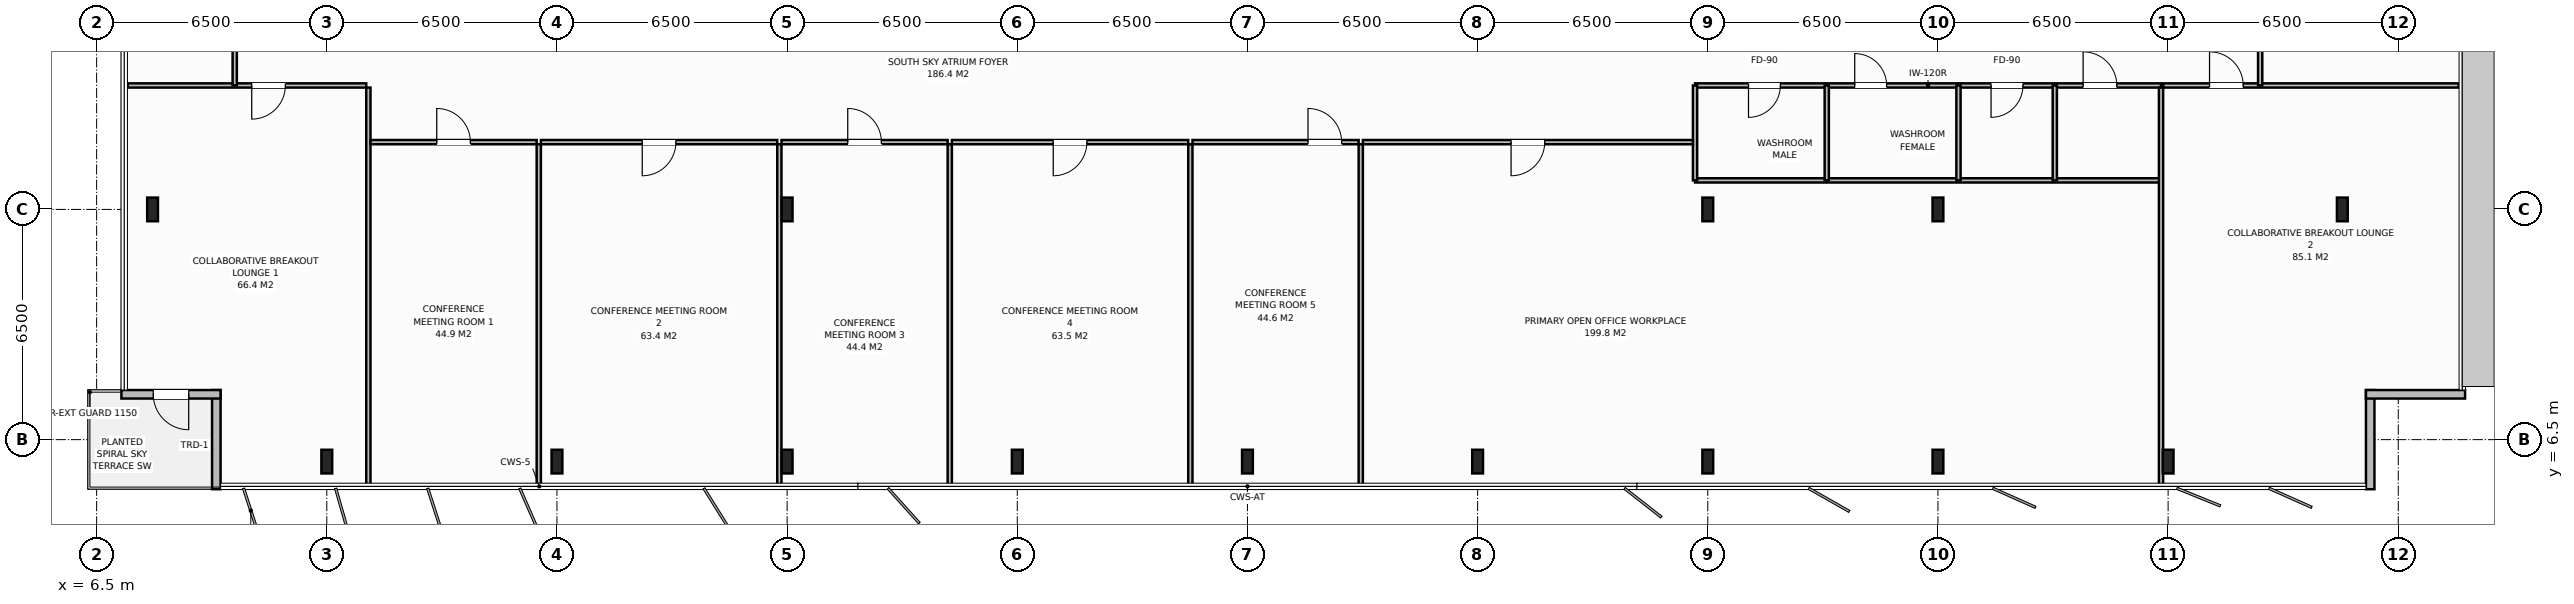
"""IFC4 building model, lengths in metres.
Left out: names, types, materials, properties, quantities, classifications, styles, units other than length and angle.
Written with IfcOpenShell. Run it as: python <this file> out.ifc"""

import sys

from ifc_helpers import new_model, si_unit, direction, frame, frame_2d, origin, origin_2d, place, context, subcontext, project, spatial, rectangle, i_section, extrude, element, fill, save


model = new_model("IFC4")
c1 = context("Model", 3, precision=1e-05, world=origin(), true_north=direction((0.0, 1.0)))
c2 = subcontext(c1, "Body", "Model", "MODEL_VIEW")
j1 = project(units=[si_unit("LENGTHUNIT", "METRE"), si_unit("PLANEANGLEUNIT", "RADIAN")], contexts=[c1])
p1 = place(None, origin())
s1 = spatial("IfcSite", under=j1, at=p1, CompositionType="ELEMENT")
p2 = place(p1, origin())
s2 = spatial("IfcBuilding", under=s1, at=p2, CompositionType="ELEMENT")
p3 = place(p2, frame((0.0, 0.0, 290.4)))
s3 = spatial("IfcBuildingStorey", under=s2, at=p3, CompositionType="ELEMENT", Elevation=290.4)
for number, where, z_axis, x_axis in (
    (1, (58.5, 13.0, 0.0), (0.0, 0.0, 1.0), (1.0, 0.0, 0.0)),
    (2, (26.0, 13.0, 0.0), (0.0, 0.0, 1.0), (1.0, 0.0, 0.0)),
    (3, (52.0, 13.0, 0.0), (0.0, 0.0, 1.0), (1.0, 0.0, 0.0)),
    (4, (13.0, 5.88, 0.0), (0.0, 0.0, 1.0), (1.0, 0.0, 0.0)),
    (5, (19.5, 5.88, 0.0), (0.0, 0.0, 1.0), (1.0, 0.0, 0.0)),
    (6, (26.0, 5.88, 0.0), (0.0, 0.0, 1.0), (1.0, 0.0, 0.0)),
    (7, (32.5, 5.88, 0.0), (0.0, 0.0, 1.0), (1.0, 0.0, 0.0)),
    (8, (39.0, 5.88, 0.0), (0.0, 0.0, 1.0), (1.0, 0.0, 0.0)),
    (9, (45.5, 5.88, 0.0), (0.0, 0.0, 1.0), (1.0, 0.0, 0.0)),
    (10, (52.0, 5.88, 0.0), (0.0, 0.0, 1.0), (1.0, 0.0, 0.0)),
    (11, (58.5, 5.88, 0.0), (0.0, 0.0, 1.0), (1.0, 0.0, 0.0)),
    (12, (65.0, 5.88, 0.0), (0.0, 0.0, 1.0), (1.0, 0.0, 0.0)),
    (13, (8.08, 13.0, 0.0), (0.0, 0.0, 1.0), (1.0, 0.0, 0.0)),
    (14, (69.92, 13.0, 0.0), (0.0, 0.0, 1.0), (1.0, 0.0, 0.0)),
):
    element("IfcColumn", number, at=place(p3, frame(where, z_axis=z_axis, x_axis=x_axis)), inside=s3, PredefinedType="COLUMN", context=c2, shape_type="SweptSolid", body=[
        extrude(i_section(OverallWidth=0.305, OverallDepth=0.668, WebThickness=0.021, FlangeThickness=0.04, at=origin_2d()), origin(), (0.0, 0.0, 1.0), 4.0),
    ])
p4 = place(p3, frame((9.88, 5.1, 0.0), z_axis=(0.0, 0.0, 1.0), x_axis=(0.0, 1.0, 0.0)))
e15 = element("IfcWall", 15, at=p4, inside=s3, PredefinedType="STANDARD", context=c2, shape_type="SweptSolid", body=[
    extrude(rectangle(XDim=2.8, YDim=0.24, at=frame_2d((1.4, 0.0))), origin(), (0.0, 0.0, 1.0), 3.788),
])
p5 = place(p3, frame((10.0, 7.78, 0.0), z_axis=(0.0, 0.0, 1.0), x_axis=(-1.0, 0.0, 0.0)))
e16 = element("IfcWall", 16, at=p5, inside=s3, PredefinedType="STANDARD", context=c2, shape_type="SweptSolid", body=[
    extrude(rectangle(XDim=2.8, YDim=0.24, at=frame_2d((1.4, 0.0))), origin(), (0.0, 0.0, 1.0), 3.788),
])
p6 = place(p5, frame((0.9, 0.0, 0.0)))
e17 = element("IfcOpeningElement", 17, at=p6, cuts=e16, PredefinedType="OPENING", context=c2, shape_type="SweptSolid", body=[
    extrude(rectangle(XDim=1.0, YDim=2.2, at=frame_2d((0.5, 1.1))), frame((0.0, 0.13, 0.0), z_axis=(0.0, -1.0, 0.0), x_axis=(1.0, 0.0, 0.0)), (0.0, 0.0, 1.0), 0.26),
])
for number, where, z_axis, x_axis in (
    (18, (70.707, 7.9, 0.0), (0.0, 0.0, 1.0), (0.0, -1.0, 0.0)),
    (19, (73.387, 7.78, 0.0), (0.0, 0.0, 1.0), (-1.0, 0.0, 0.0)),
):
    element("IfcWall", number, at=place(p3, frame(where, z_axis=z_axis, x_axis=x_axis)), inside=s3, PredefinedType="STANDARD", context=c2, shape_type="SweptSolid", body=[
        extrude(rectangle(XDim=2.8, YDim=0.24, at=frame_2d((1.4, 0.0))), origin(), (0.0, 0.0, 1.0), 3.788),
    ])
p7 = place(p3, frame((51.64, 16.5, 0.0), z_axis=(0.0, 0.0, 1.0), x_axis=(1.0, 0.0, 0.0)))
e20 = element("IfcWall", 20, at=p7, inside=s3, PredefinedType="PARTITIONING", context=c2, shape_type="SweptSolid", body=[
    extrude(rectangle(XDim=13.16, YDim=0.12, at=frame_2d((6.58, 0.0))), origin(), (0.0, 0.0, 1.0), 3.788),
])
p8 = place(p7, frame((1.51, 0.0, 0.0)))
e21 = element("IfcOpeningElement", 21, at=p8, cuts=e20, PredefinedType="OPENING", context=c2, shape_type="SweptSolid", body=[
    extrude(rectangle(XDim=0.9, YDim=2.15, at=frame_2d((0.45, 1.075))), frame((0.0, 0.07, 0.0), z_axis=(0.0, -1.0, 0.0), x_axis=(1.0, 0.0, 0.0)), (0.0, 0.0, 1.0), 0.14),
])
p9 = place(p7, frame((4.51, 0.0, 0.0)))
e22 = element("IfcOpeningElement", 22, at=p9, cuts=e20, PredefinedType="OPENING", context=c2, shape_type="SweptSolid", body=[
    extrude(rectangle(XDim=0.9, YDim=2.15, at=frame_2d((0.45, 1.075))), frame((0.0, 0.07, 0.0), z_axis=(0.0, -1.0, 0.0), x_axis=(1.0, 0.0, 0.0)), (0.0, 0.0, 1.0), 0.14),
])
p10 = place(p7, frame((8.36, 0.0, 0.0)))
e23 = element("IfcOpeningElement", 23, at=p10, cuts=e20, PredefinedType="OPENING", context=c2, shape_type="SweptSolid", body=[
    extrude(rectangle(XDim=0.9, YDim=2.15, at=frame_2d((0.45, 1.075))), frame((0.0, 0.07, 0.0), z_axis=(0.0, -1.0, 0.0), x_axis=(1.0, 0.0, 0.0)), (0.0, 0.0, 1.0), 0.14),
])
p11 = place(p7, frame((10.96, 0.0, 0.0)))
e24 = element("IfcOpeningElement", 24, at=p11, cuts=e20, PredefinedType="OPENING", context=c2, shape_type="SweptSolid", body=[
    extrude(rectangle(XDim=0.95, YDim=2.15, at=frame_2d((0.475, 1.075))), frame((0.0, 0.07, 0.0), z_axis=(0.0, -1.0, 0.0), x_axis=(1.0, 0.0, 0.0)), (0.0, 0.0, 1.0), 0.14),
])
p12 = place(p3, frame((51.64, 13.82, 0.0), z_axis=(0.0, 0.0, 1.0), x_axis=(1.0, 0.0, 0.0)))
e25 = element("IfcWall", 25, at=p12, inside=s3, PredefinedType="PARTITIONING", context=c2, shape_type="SweptSolid", body=[
    extrude(rectangle(XDim=13.16, YDim=0.12, at=frame_2d((6.58, 0.0))), origin(), (0.0, 0.0, 1.0), 3.788),
])
for number, where, z_axis, x_axis in (
    (26, (51.64, 13.82, 0.0), (0.0, 0.0, 1.0), (0.0, 1.0, 0.0)),
    (27, (55.36, 13.82, 0.0), (0.0, 0.0, 1.0), (0.0, 1.0, 0.0)),
    (28, (59.08, 13.82, 0.0), (0.0, 0.0, 1.0), (0.0, 1.0, 0.0)),
    (29, (61.8, 13.82, 0.0), (0.0, 0.0, 1.0), (0.0, 1.0, 0.0)),
):
    element("IfcWall", number, at=place(p3, frame(where, z_axis=z_axis, x_axis=x_axis)), inside=s3, PredefinedType="PARTITIONING", context=c2, shape_type="SweptSolid", body=[
        extrude(rectangle(XDim=2.68, YDim=0.12, at=frame_2d((1.34, 0.0))), origin(), (0.0, 0.0, 1.0), 3.788),
    ])
p13 = place(p3, frame((14.174, 5.12, 0.0), z_axis=(0.0, 0.0, 1.0), x_axis=(0.0, 1.0, 0.0)))
e30 = element("IfcWall", 30, at=p13, inside=s3, PredefinedType="PARTITIONING", context=c2, shape_type="SweptSolid", body=[
    extrude(rectangle(XDim=11.32, YDim=0.12, at=frame_2d((5.66, 0.0))), origin(), (0.0, 0.0, 1.0), 3.788),
])
p14 = place(p3, frame((7.38, 16.5, 0.0), z_axis=(0.0, 0.0, 1.0), x_axis=(1.0, 0.0, 0.0)))
e31 = element("IfcWall", 31, at=p14, inside=s3, PredefinedType="PARTITIONING", context=c2, shape_type="SweptSolid", body=[
    extrude(rectangle(XDim=6.734, YDim=0.12, at=frame_2d((3.367, 0.0))), origin(), (0.0, 0.0, 1.0), 3.788),
])
p15 = place(p14, frame((3.5, 0.0, 0.0)))
e32 = element("IfcOpeningElement", 32, at=p15, cuts=e31, PredefinedType="OPENING", context=c2, shape_type="SweptSolid", body=[
    extrude(rectangle(XDim=0.95, YDim=2.15, at=frame_2d((0.475, 1.075))), frame((0.0, 0.07, 0.0), z_axis=(0.0, -1.0, 0.0), x_axis=(1.0, 0.0, 0.0)), (0.0, 0.0, 1.0), 0.14),
])
p16 = place(p3, frame((18.987, 5.12, 0.0), z_axis=(0.0, 0.0, 1.0), x_axis=(0.0, 1.0, 0.0)))
e33 = element("IfcWall", 33, at=p16, inside=s3, PredefinedType="PARTITIONING", context=c2, shape_type="SweptSolid", body=[
    extrude(rectangle(XDim=9.72, YDim=0.12, at=frame_2d((4.86, 0.0))), origin(), (0.0, 0.0, 1.0), 3.788),
])
p17 = place(p3, frame((14.234, 14.9, 0.0), z_axis=(0.0, 0.0, 1.0), x_axis=(1.0, 0.0, 0.0)))
e34 = element("IfcWall", 34, at=p17, inside=s3, PredefinedType="PARTITIONING", context=c2, shape_type="SweptSolid", body=[
    extrude(rectangle(XDim=4.693, YDim=0.12, at=frame_2d((2.346, 0.0))), origin(), (0.0, 0.0, 1.0), 3.788),
])
p18 = place(p17, frame((1.871, 0.0, 0.0)))
e35 = element("IfcOpeningElement", 35, at=p18, cuts=e34, PredefinedType="OPENING", context=c2, shape_type="SweptSolid", body=[
    extrude(rectangle(XDim=0.95, YDim=2.15, at=frame_2d((0.475, 1.075))), frame((0.0, 0.07, 0.0), z_axis=(0.0, -1.0, 0.0), x_axis=(1.0, 0.0, 0.0)), (0.0, 0.0, 1.0), 0.14),
])
p19 = place(p3, frame((25.781, 5.12, 0.0), z_axis=(0.0, 0.0, 1.0), x_axis=(0.0, 1.0, 0.0)))
e36 = element("IfcWall", 36, at=p19, inside=s3, PredefinedType="PARTITIONING", context=c2, shape_type="SweptSolid", body=[
    extrude(rectangle(XDim=9.72, YDim=0.12, at=frame_2d((4.86, 0.0))), origin(), (0.0, 0.0, 1.0), 2.988),
])
p20 = place(p3, frame((19.047, 14.9, 0.0), z_axis=(0.0, 0.0, 1.0), x_axis=(1.0, 0.0, 0.0)))
e37 = element("IfcWall", 37, at=p20, inside=s3, PredefinedType="PARTITIONING", context=c2, shape_type="SweptSolid", body=[
    extrude(rectangle(XDim=6.674, YDim=0.12, at=frame_2d((3.337, 0.0))), origin(), (0.0, 0.0, 1.0), 3.788),
])
p21 = place(p20, frame((2.862, 0.0, 0.0)))
e38 = element("IfcOpeningElement", 38, at=p21, cuts=e37, PredefinedType="OPENING", context=c2, shape_type="SweptSolid", body=[
    extrude(rectangle(XDim=0.95, YDim=2.15, at=frame_2d((0.475, 1.075))), frame((0.0, 0.07, 0.0), z_axis=(0.0, -1.0, 0.0), x_axis=(1.0, 0.0, 0.0)), (0.0, 0.0, 1.0), 0.14),
])
p22 = place(p3, frame((30.593, 5.12, 0.0), z_axis=(0.0, 0.0, 1.0), x_axis=(0.0, 1.0, 0.0)))
e39 = element("IfcWall", 39, at=p22, inside=s3, PredefinedType="PARTITIONING", context=c2, shape_type="SweptSolid", body=[
    extrude(rectangle(XDim=9.72, YDim=0.12, at=frame_2d((4.86, 0.0))), origin(), (0.0, 0.0, 1.0), 3.788),
])
p23 = place(p3, frame((25.841, 14.9, 0.0), z_axis=(0.0, 0.0, 1.0), x_axis=(1.0, 0.0, 0.0)))
e40 = element("IfcWall", 40, at=p23, inside=s3, PredefinedType="PARTITIONING", context=c2, shape_type="SweptSolid", body=[
    extrude(rectangle(XDim=4.692, YDim=0.12, at=frame_2d((2.346, 0.0))), origin(), (0.0, 0.0, 1.0), 3.788),
])
p24 = place(p23, frame((1.871, 0.0, 0.0)))
e41 = element("IfcOpeningElement", 41, at=p24, cuts=e40, PredefinedType="OPENING", context=c2, shape_type="SweptSolid", body=[
    extrude(rectangle(XDim=0.95, YDim=2.15, at=frame_2d((0.475, 1.075))), frame((0.0, 0.07, 0.0), z_axis=(0.0, -1.0, 0.0), x_axis=(1.0, 0.0, 0.0)), (0.0, 0.0, 1.0), 0.14),
])
p25 = place(p3, frame((37.387, 5.12, 0.0), z_axis=(0.0, 0.0, 1.0), x_axis=(0.0, 1.0, 0.0)))
e42 = element("IfcWall", 42, at=p25, inside=s3, PredefinedType="PARTITIONING", context=c2, shape_type="SweptSolid", body=[
    extrude(rectangle(XDim=9.72, YDim=0.12, at=frame_2d((4.86, 0.0))), origin(), (0.0, 0.0, 1.0), 3.788),
])
p26 = place(p3, frame((30.653, 14.9, 0.0), z_axis=(0.0, 0.0, 1.0), x_axis=(1.0, 0.0, 0.0)))
e43 = element("IfcWall", 43, at=p26, inside=s3, PredefinedType="PARTITIONING", context=c2, shape_type="SweptSolid", body=[
    extrude(rectangle(XDim=6.674, YDim=0.12, at=frame_2d((3.337, 0.0))), origin(), (0.0, 0.0, 1.0), 3.788),
])
p27 = place(p26, frame((2.862, 0.0, 0.0)))
e44 = element("IfcOpeningElement", 44, at=p27, cuts=e43, PredefinedType="OPENING", context=c2, shape_type="SweptSolid", body=[
    extrude(rectangle(XDim=0.95, YDim=2.15, at=frame_2d((0.475, 1.075))), frame((0.0, 0.07, 0.0), z_axis=(0.0, -1.0, 0.0), x_axis=(1.0, 0.0, 0.0)), (0.0, 0.0, 1.0), 0.14),
])
p28 = place(p3, frame((42.2, 5.12, 0.0), z_axis=(0.0, 0.0, 1.0), x_axis=(0.0, 1.0, 0.0)))
e45 = element("IfcWall", 45, at=p28, inside=s3, PredefinedType="PARTITIONING", context=c2, shape_type="SweptSolid", body=[
    extrude(rectangle(XDim=9.72, YDim=0.12, at=frame_2d((4.86, 0.0))), origin(), (0.0, 0.0, 1.0), 3.788),
])
p29 = place(p3, frame((37.448, 14.9, 0.0), z_axis=(0.0, 0.0, 1.0), x_axis=(1.0, 0.0, 0.0)))
e46 = element("IfcWall", 46, at=p29, inside=s3, PredefinedType="PARTITIONING", context=c2, shape_type="SweptSolid", body=[
    extrude(rectangle(XDim=4.692, YDim=0.12, at=frame_2d((2.346, 0.0))), origin(), (0.0, 0.0, 1.0), 3.788),
])
p30 = place(p29, frame((3.262, 0.0, 0.0)))
e47 = element("IfcOpeningElement", 47, at=p30, cuts=e46, PredefinedType="OPENING", context=c2, shape_type="SweptSolid", body=[
    extrude(rectangle(XDim=0.95, YDim=2.15, at=frame_2d((0.475, 1.075))), frame((0.0, 0.07, 0.0), z_axis=(0.0, -1.0, 0.0), x_axis=(1.0, 0.0, 0.0)), (0.0, 0.0, 1.0), 0.14),
])
p31 = place(p3, frame((64.8, 5.12, 0.0), z_axis=(0.0, 0.0, 1.0), x_axis=(0.0, 1.0, 0.0)))
e48 = element("IfcWall", 48, at=p31, inside=s3, PredefinedType="PARTITIONING", context=c2, shape_type="SweptSolid", body=[
    extrude(rectangle(XDim=11.32, YDim=0.12, at=frame_2d((5.66, 0.0))), origin(), (0.0, 0.0, 1.0), 2.988),
])
p32 = place(p3, frame((42.26, 14.9, 0.0), z_axis=(0.0, 0.0, 1.0), x_axis=(1.0, 0.0, 0.0)))
e49 = element("IfcWall", 49, at=p32, inside=s3, PredefinedType="PARTITIONING", context=c2, shape_type="SweptSolid", body=[
    extrude(rectangle(XDim=9.32, YDim=0.12, at=frame_2d((4.66, 0.0))), origin(), (0.0, 0.0, 1.0), 3.788),
])
p33 = place(p32, frame((4.185, 0.0, 0.0)))
e50 = element("IfcOpeningElement", 50, at=p33, cuts=e49, PredefinedType="OPENING", context=c2, shape_type="SweptSolid", body=[
    extrude(rectangle(XDim=0.95, YDim=2.15, at=frame_2d((0.475, 1.075))), frame((0.0, 0.07, 0.0), z_axis=(0.0, -1.0, 0.0), x_axis=(1.0, 0.0, 0.0)), (0.0, 0.0, 1.0), 0.14),
])
p34 = place(p3, frame((64.86, 16.5, 0.0), z_axis=(0.0, 0.0, 1.0), x_axis=(1.0, 0.0, 0.0)))
e51 = element("IfcWall", 51, at=p34, inside=s3, PredefinedType="PARTITIONING", context=c2, shape_type="SweptSolid", body=[
    extrude(rectangle(XDim=8.347, YDim=0.12, at=frame_2d((4.174, 0.0))), origin(), (0.0, 0.0, 1.0), 3.788),
])
p35 = place(p34, frame((1.31, 0.0, 0.0)))
e52 = element("IfcOpeningElement", 52, at=p35, cuts=e51, PredefinedType="OPENING", context=c2, shape_type="SweptSolid", body=[
    extrude(rectangle(XDim=0.95, YDim=2.15, at=frame_2d((0.475, 1.075))), frame((0.0, 0.07, 0.0), z_axis=(0.0, -1.0, 0.0), x_axis=(1.0, 0.0, 0.0)), (0.0, 0.0, 1.0), 0.14),
])
p36 = place(p3, frame((10.4, 16.5, 0.0), z_axis=(0.0, 0.0, 1.0), x_axis=(0.0, 1.0, 0.0)))
e53 = element("IfcWall", 53, at=p36, inside=s3, PredefinedType="PARTITIONING", context=c2, shape_type="SweptSolid", body=[
    extrude(rectangle(XDim=6.333, YDim=0.12, at=frame_2d((3.167, 0.0))), origin(), (0.0, 0.0, 1.0), 3.788),
])
p37 = place(p36, frame((3.742, 0.0, 0.0)))
e54 = element("IfcOpeningElement", 54, at=p37, cuts=e53, PredefinedType="OPENING", context=c2, shape_type="SweptSolid", body=[
    extrude(rectangle(XDim=0.95, YDim=2.15, at=frame_2d((0.475, 1.075))), frame((0.0, 0.07, 0.0), z_axis=(0.0, -1.0, 0.0), x_axis=(1.0, 0.0, 0.0)), (0.0, 0.0, 1.0), 0.14),
])
p38 = place(p3, frame((67.6, 16.5, 0.0), z_axis=(0.0, 0.0, 1.0), x_axis=(0.0, 1.0, 0.0)))
e55 = element("IfcWall", 55, at=p38, inside=s3, PredefinedType="PARTITIONING", context=c2, shape_type="SweptSolid", body=[
    extrude(rectangle(XDim=16.9, YDim=0.12, at=frame_2d((8.45, 0.0))), origin(), (0.0, 0.0, 1.0), 3.788),
])
p39 = place(p38, frame((9.025, 0.0, 0.0)))
e56 = element("IfcOpeningElement", 56, at=p39, cuts=e55, PredefinedType="OPENING", context=c2, shape_type="SweptSolid", body=[
    extrude(rectangle(XDim=0.95, YDim=2.15, at=frame_2d((0.475, 1.075))), frame((0.0, 0.07, 0.0), z_axis=(0.0, -1.0, 0.0), x_axis=(1.0, 0.0, 0.0)), (0.0, 0.0, 1.0), 0.14),
])
p40 = place(p6, origin())
e57 = element("IfcDoor", 57, at=p40, inside=s3, OperationType="SINGLE_SWING_LEFT", PredefinedType="DOOR", context=c2, shape_type="SweptSolid", body=[
    extrude(rectangle(XDim=1.0, YDim=2.2, at=frame_2d((0.5, 1.1))), frame((0.0, 0.025, 0.0), z_axis=(0.0, -1.0, 0.0), x_axis=(1.0, 0.0, 0.0)), (0.0, 0.0, 1.0), 0.05),
])
fill(e17, e57)
p41 = place(p8, origin())
e58 = element("IfcDoor", 58, at=p41, inside=s3, OperationType="SINGLE_SWING_RIGHT", PredefinedType="DOOR", context=c2, shape_type="SweptSolid", body=[
    extrude(rectangle(XDim=0.9, YDim=2.15, at=frame_2d((0.45, 1.075))), frame((0.0, 0.025, 0.0), z_axis=(0.0, -1.0, 0.0), x_axis=(1.0, 0.0, 0.0)), (0.0, 0.0, 1.0), 0.05),
])
fill(e21, e58)
p42 = place(p9, origin())
e59 = element("IfcDoor", 59, at=p42, inside=s3, OperationType="SINGLE_SWING_LEFT", PredefinedType="DOOR", context=c2, shape_type="SweptSolid", body=[
    extrude(rectangle(XDim=0.9, YDim=2.15, at=frame_2d((0.45, 1.075))), frame((0.0, 0.025, 0.0), z_axis=(0.0, -1.0, 0.0), x_axis=(1.0, 0.0, 0.0)), (0.0, 0.0, 1.0), 0.05),
])
fill(e22, e59)
p43 = place(p10, origin())
e60 = element("IfcDoor", 60, at=p43, inside=s3, OperationType="SINGLE_SWING_RIGHT", PredefinedType="DOOR", context=c2, shape_type="SweptSolid", body=[
    extrude(rectangle(XDim=0.9, YDim=2.15, at=frame_2d((0.45, 1.075))), frame((0.0, 0.025, 0.0), z_axis=(0.0, -1.0, 0.0), x_axis=(1.0, 0.0, 0.0)), (0.0, 0.0, 1.0), 0.05),
])
fill(e23, e60)
p44 = place(p11, origin())
e61 = element("IfcDoor", 61, at=p44, inside=s3, OperationType="SINGLE_SWING_LEFT", PredefinedType="DOOR", context=c2, shape_type="SweptSolid", body=[
    extrude(rectangle(XDim=0.95, YDim=2.15, at=frame_2d((0.475, 1.075))), frame((0.0, 0.025, 0.0), z_axis=(0.0, -1.0, 0.0), x_axis=(1.0, 0.0, 0.0)), (0.0, 0.0, 1.0), 0.05),
])
fill(e24, e61)
p45 = place(p15, origin())
e62 = element("IfcDoor", 62, at=p45, inside=s3, OperationType="SINGLE_SWING_RIGHT", PredefinedType="DOOR", context=c2, shape_type="SweptSolid", body=[
    extrude(rectangle(XDim=0.95, YDim=2.15, at=frame_2d((0.475, 1.075))), frame((0.0, 0.025, 0.0), z_axis=(0.0, -1.0, 0.0), x_axis=(1.0, 0.0, 0.0)), (0.0, 0.0, 1.0), 0.05),
])
fill(e32, e62)
p46 = place(p18, origin())
e63 = element("IfcDoor", 63, at=p46, inside=s3, OperationType="SINGLE_SWING_LEFT", PredefinedType="DOOR", context=c2, shape_type="SweptSolid", body=[
    extrude(rectangle(XDim=0.95, YDim=2.15, at=frame_2d((0.475, 1.075))), frame((0.0, 0.025, 0.0), z_axis=(0.0, -1.0, 0.0), x_axis=(1.0, 0.0, 0.0)), (0.0, 0.0, 1.0), 0.05),
])
fill(e35, e63)
p47 = place(p21, origin())
e64 = element("IfcDoor", 64, at=p47, inside=s3, OperationType="SINGLE_SWING_RIGHT", PredefinedType="DOOR", context=c2, shape_type="SweptSolid", body=[
    extrude(rectangle(XDim=0.95, YDim=2.15, at=frame_2d((0.475, 1.075))), frame((0.0, 0.025, 0.0), z_axis=(0.0, -1.0, 0.0), x_axis=(1.0, 0.0, 0.0)), (0.0, 0.0, 1.0), 0.05),
])
fill(e38, e64)
p48 = place(p24, origin())
e65 = element("IfcDoor", 65, at=p48, inside=s3, OperationType="SINGLE_SWING_LEFT", PredefinedType="DOOR", context=c2, shape_type="SweptSolid", body=[
    extrude(rectangle(XDim=0.95, YDim=2.15, at=frame_2d((0.475, 1.075))), frame((0.0, 0.025, 0.0), z_axis=(0.0, -1.0, 0.0), x_axis=(1.0, 0.0, 0.0)), (0.0, 0.0, 1.0), 0.05),
])
fill(e41, e65)
p49 = place(p27, origin())
e66 = element("IfcDoor", 66, at=p49, inside=s3, OperationType="SINGLE_SWING_RIGHT", PredefinedType="DOOR", context=c2, shape_type="SweptSolid", body=[
    extrude(rectangle(XDim=0.95, YDim=2.15, at=frame_2d((0.475, 1.075))), frame((0.0, 0.025, 0.0), z_axis=(0.0, -1.0, 0.0), x_axis=(1.0, 0.0, 0.0)), (0.0, 0.0, 1.0), 0.05),
])
fill(e44, e66)
p50 = place(p30, origin())
e67 = element("IfcDoor", 67, at=p50, inside=s3, OperationType="SINGLE_SWING_LEFT", PredefinedType="DOOR", context=c2, shape_type="SweptSolid", body=[
    extrude(rectangle(XDim=0.95, YDim=2.15, at=frame_2d((0.475, 1.075))), frame((0.0, 0.025, 0.0), z_axis=(0.0, -1.0, 0.0), x_axis=(1.0, 0.0, 0.0)), (0.0, 0.0, 1.0), 0.05),
])
fill(e47, e67)
p51 = place(p33, origin())
e68 = element("IfcDoor", 68, at=p51, inside=s3, OperationType="SINGLE_SWING_RIGHT", PredefinedType="DOOR", context=c2, shape_type="SweptSolid", body=[
    extrude(rectangle(XDim=0.95, YDim=2.15, at=frame_2d((0.475, 1.075))), frame((0.0, 0.025, 0.0), z_axis=(0.0, -1.0, 0.0), x_axis=(1.0, 0.0, 0.0)), (0.0, 0.0, 1.0), 0.05),
])
fill(e50, e68)
p52 = place(p35, origin())
e69 = element("IfcDoor", 69, at=p52, inside=s3, OperationType="SINGLE_SWING_LEFT", PredefinedType="DOOR", context=c2, shape_type="SweptSolid", body=[
    extrude(rectangle(XDim=0.95, YDim=2.15, at=frame_2d((0.475, 1.075))), frame((0.0, 0.025, 0.0), z_axis=(0.0, -1.0, 0.0), x_axis=(1.0, 0.0, 0.0)), (0.0, 0.0, 1.0), 0.05),
])
fill(e52, e69)
save(model, sys.argv[1])
